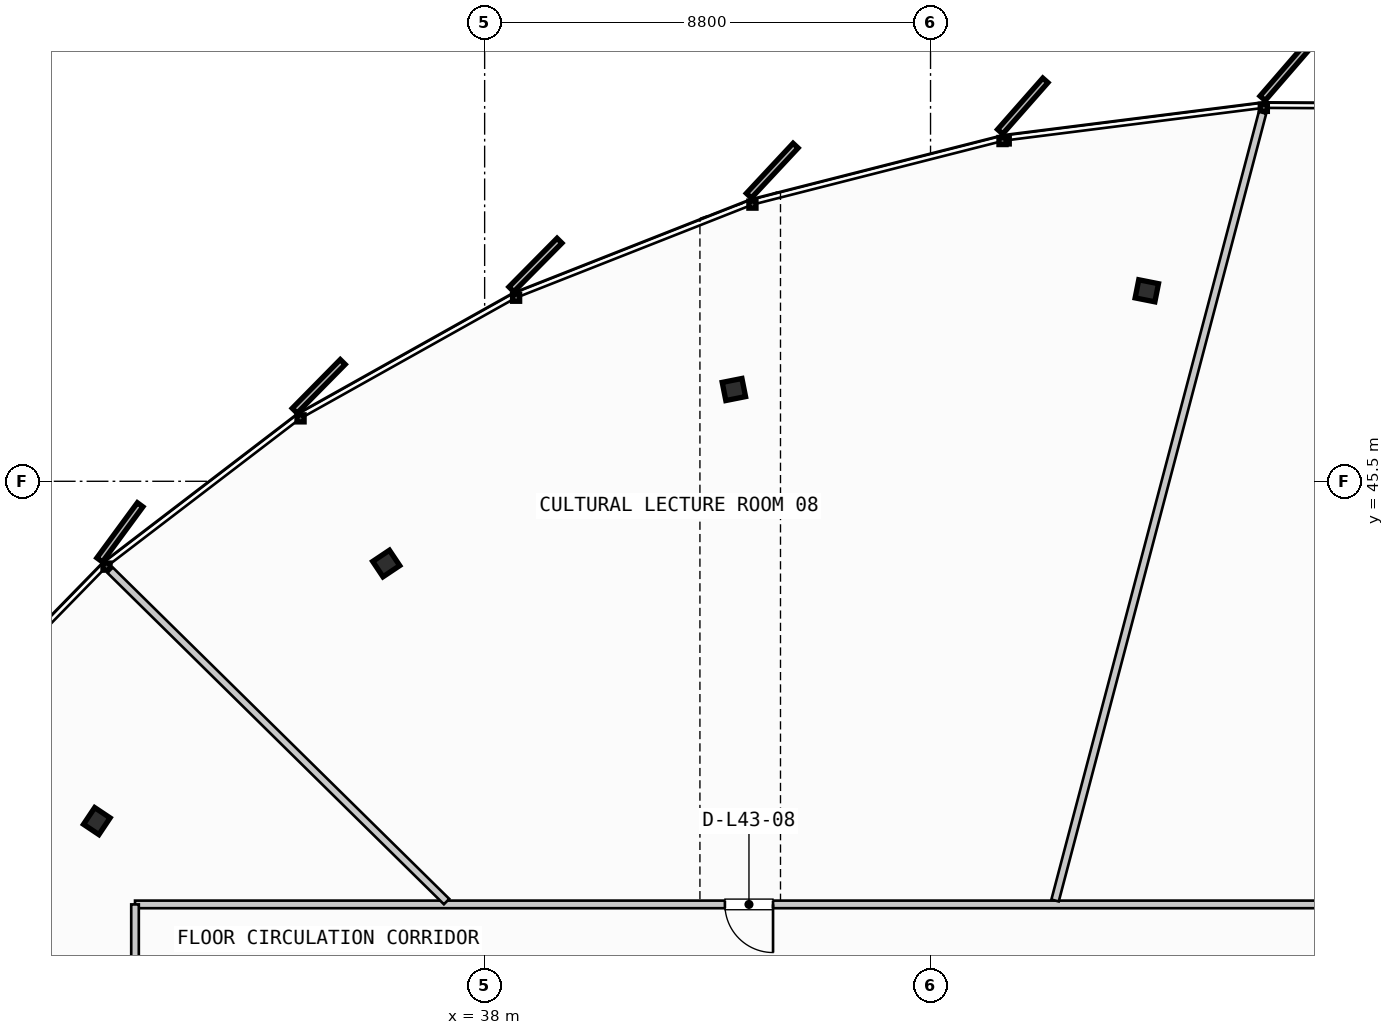
"""IFC4 building model, lengths in metres.
Left out: names, types, materials, properties, quantities, classifications, styles, units other than length and angle.
Written with IfcOpenShell. Run it as: python <this file> out.ifc"""

import sys

from ifc_helpers import new_model, si_unit, direction, frame, frame_2d, origin, origin_2d, place, context, subcontext, project, spatial, rectangle, i_section, extrude, source, transform, mapped, element, fill, save


model = new_model("IFC4")
c1 = context("Model", 3, precision=1e-05, world=origin(), true_north=direction((0.0, 1.0)))
c2 = subcontext(c1, "Body", "Model", "MODEL_VIEW")
j1 = project(units=[si_unit("LENGTHUNIT", "METRE"), si_unit("PLANEANGLEUNIT", "RADIAN")], contexts=[c1])
p1 = place(None, origin())
s1 = spatial("IfcSite", under=j1, at=p1, CompositionType="ELEMENT")
p2 = place(p1, origin())
s2 = spatial("IfcBuilding", under=s1, at=p2, CompositionType="ELEMENT")
p3 = place(p2, frame((0.0, 0.0, 167.85)))
s3 = spatial("IfcBuildingStorey", under=s2, at=p3, CompositionType="ELEMENT", Elevation=167.85)
m1 = source(origin(), c2, "Body", "SweptSolid", [
    extrude(i_section(OverallWidth=0.397, OverallDepth=0.365, WebThickness=0.028, FlangeThickness=0.044, FilletRadius=0.015, at=origin_2d()), origin(), (0.0, 0.0, 1.0), 3.24),
])
for number, where, z_axis, x_axis in (
    (1, (51.069, 49.259, 0.0), (0.0, 0.0, 1.0), (0.195, 0.981, 0.0)),
    (2, (42.919, 47.311, 0.0), (0.0, 0.0, 1.0), (-0.195, 0.981, 0.0)),
    (3, (36.058, 43.877, 0.0), (0.0, 0.0, 1.0), (-0.556, 0.831, 0.0)),
    (4, (30.346, 38.794, 0.0), (0.0, 0.0, 1.0), (-0.831, 0.556, 0.0)),
):
    element("IfcColumn", number, at=place(p3, frame(where, z_axis=z_axis, x_axis=x_axis)), inside=s3, PredefinedType="COLUMN", context=c2, shape_type="MappedRepresentation", body=[
        mapped(m1, transform((0.0, 0.0, 0.0), scale=1.0)),
    ])
p4 = place(p3, frame((62.5, 37.15, 0.0), z_axis=(0.0, 0.0, 1.0), x_axis=(-1.0, 0.0, 0.0)))
e5 = element("IfcWall", 5, at=p4, inside=s3, PredefinedType="PARTITIONING", context=c2, shape_type="SweptSolid", body=[
    extrude(rectangle(XDim=31.4, YDim=0.15, at=frame_2d((15.7, 0.0))), origin(), (0.0, 0.0, 1.0), 2.28),
])
p5 = place(p4, frame((6.446, 0.0, 0.0)))
e6 = element("IfcOpeningElement", 6, at=p5, cuts=e5, PredefinedType="OPENING", context=c2, shape_type="SweptSolid", body=[
    extrude(rectangle(XDim=0.95, YDim=2.15, at=frame_2d((0.475, 1.075))), frame((0.0, 0.085, 0.0), z_axis=(0.0, -1.0, 0.0), x_axis=(1.0, 0.0, 0.0)), (0.0, 0.0, 1.0), 0.17),
])
p6 = place(p4, frame((18.808, 0.0, 0.0)))
e7 = element("IfcOpeningElement", 7, at=p6, cuts=e5, PredefinedType="OPENING", context=c2, shape_type="SweptSolid", body=[
    extrude(rectangle(XDim=0.95, YDim=2.15, at=frame_2d((0.475, 1.075))), frame((0.0, 0.085, 0.0), z_axis=(0.0, -1.0, 0.0), x_axis=(1.0, 0.0, 0.0)), (0.0, 0.0, 1.0), 0.17),
])
p7 = place(p3, frame((31.1, 37.15, 0.0), z_axis=(0.0, 0.0, 1.0), x_axis=(0.0, -1.0, 0.0)))
e8 = element("IfcWall", 8, at=p7, inside=s3, PredefinedType="PARTITIONING", context=c2, shape_type="SweptSolid", body=[
    extrude(rectangle(XDim=1.7, YDim=0.15, at=frame_2d((0.85, 0.0))), origin(), (0.0, 0.0, 1.0), 2.28),
])
p8 = place(p3, frame((49.258, 37.227, 0.0), z_axis=(0.0, 0.0, 1.0), x_axis=(0.25468017692, 0.967025339629, 0.0)))
e9 = element("IfcWall", 9, at=p8, inside=s3, PredefinedType="PARTITIONING", context=c2, shape_type="SweptSolid", body=[
    extrude(rectangle(XDim=16.076, YDim=0.15, at=frame_2d((8.038, 0.0))), origin(), (0.0, 0.0, 1.0), 2.28),
])
p9 = place(p3, frame((37.249, 37.206, 0.0), z_axis=(0.0, 0.0, 1.0), x_axis=(-0.712469695258, 0.701702881096, 0.0)))
e10 = element("IfcWall", 10, at=p9, inside=s3, PredefinedType="PARTITIONING", context=c2, shape_type="SweptSolid", body=[
    extrude(rectangle(XDim=9.32, YDim=0.15, at=frame_2d((4.66, 0.0))), origin(), (0.0, 0.0, 1.0), 2.28),
])
m2 = source(origin(), c2, "Body", "SweptSolid", [
    extrude(rectangle(XDim=0.95, YDim=2.15, at=frame_2d((0.475, 1.075))), frame((0.0, 0.025, 0.0), z_axis=(0.0, -1.0, 0.0), x_axis=(1.0, 0.0, 0.0)), (0.0, 0.0, 1.0), 0.05),
])
p10 = place(p6, origin())
e11 = element("IfcDoor", 11, at=p10, inside=s3, OperationType="SINGLE_SWING_LEFT", PredefinedType="DOOR", context=c2, shape_type="MappedRepresentation", body=[
    mapped(m2, transform((0.0, 0.0, 0.0), scale=1.0)),
])
fill(e7, e11)
save(model, sys.argv[1])
